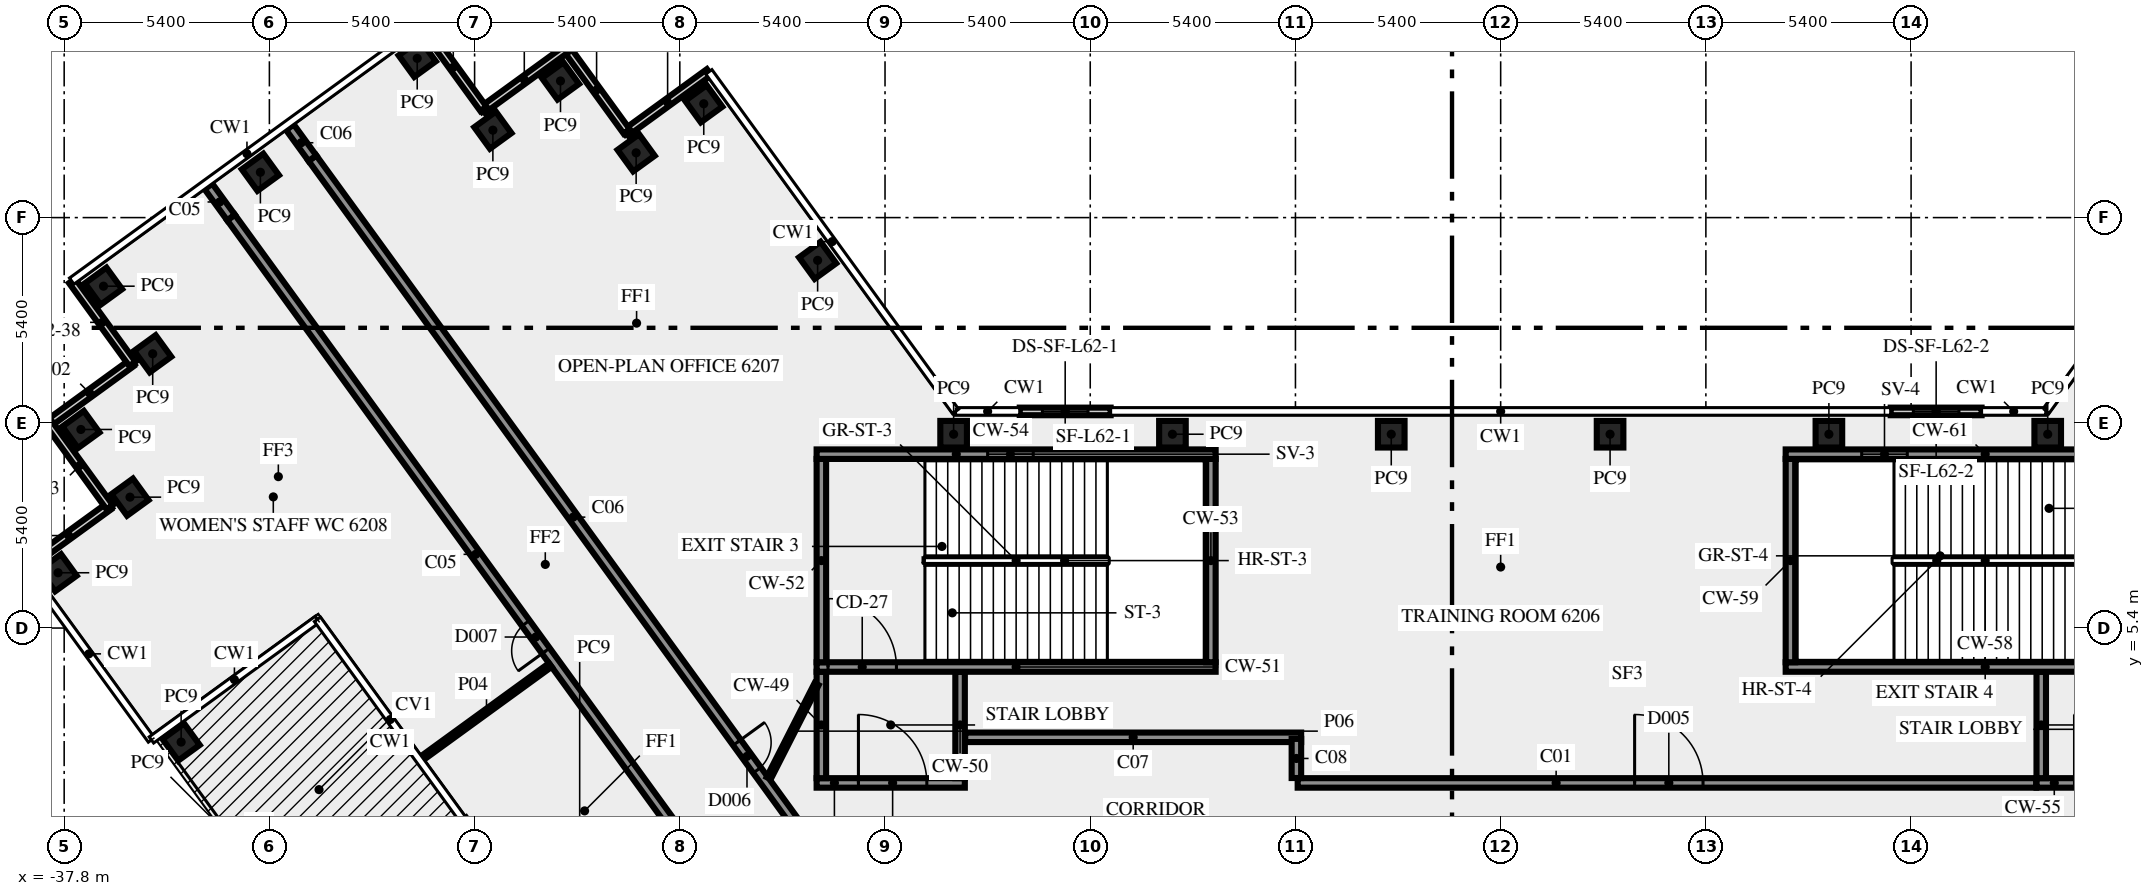
"""IFC4 building model, lengths in metres.
Left out: names, types, materials, properties, quantities, classifications, styles, units other than length and angle.
Written with IfcOpenShell. Run it as: python <this file> out.ifc"""

import sys

from ifc_helpers import new_model, si_unit, direction, frame, frame_2d, origin, origin_2d, place, context, subcontext, project, spatial, rectangle, extrude, element, fill, save


model = new_model("IFC4")
c1 = context("Model", 3, precision=1e-05, world=origin(), true_north=direction((0.0, 1.0)))
c2 = subcontext(c1, "Body", "Model", "MODEL_VIEW")
j1 = project(units=[si_unit("LENGTHUNIT", "METRE"), si_unit("PLANEANGLEUNIT", "RADIAN")], contexts=[c1])
p1 = place(None, origin())
s1 = spatial("IfcSite", under=j1, at=p1, CompositionType="ELEMENT")
p2 = place(p1, origin())
s2 = spatial("IfcBuilding", under=s1, at=p2, CompositionType="ELEMENT")
p3 = place(p2, frame((0.0, 0.0, 265.0)))
s3 = spatial("IfcBuildingStorey", under=s2, at=p3, CompositionType="ELEMENT", Elevation=265.0)
for number, where, z_axis, x_axis in (
    (1, (-17.974, 15.075, 0.0), (0.0, 0.0, 1.0), (-0.588, 0.809, 0.0)),
    (2, (-20.97, 19.195, 0.0), (0.0, 0.0, 1.0), (-0.588, 0.809, 0.0)),
    (3, (-22.749, 17.904, 0.0), (0.0, 0.0, 1.0), (-0.588, 0.809, 0.0)),
    (4, (-24.74, 19.795, 0.0), (0.0, 0.0, 1.0), (-0.588, 0.809, 0.0)),
    (5, (-26.519, 18.5, 0.0), (0.0, 0.0, 1.0), (-0.588, 0.809, 0.0)),
    (6, (-28.51, 20.39, 0.0), (0.0, 0.0, 1.0), (-0.809, -0.588, 0.0)),
    (7, (-32.637, 17.393, 0.0), (0.0, 0.0, 1.0), (-0.809, -0.588, 0.0)),
    (8, (-36.765, 14.395, 0.0), (0.0, 0.0, 1.0), (0.588, -0.809, 0.0)),
    (9, (-35.471, 12.616, 0.0), (0.0, 0.0, 1.0), (-0.809, -0.588, 0.0)),
    (10, (-37.36, 10.625, 0.0), (0.0, 0.0, 1.0), (0.588, -0.809, 0.0)),
    (11, (-36.068, 8.844, 0.0), (0.0, 0.0, 1.0), (0.588, -0.809, 0.0)),
    (12, (-37.96, 6.855, 0.0), (0.0, 0.0, 1.0), (0.588, -0.809, 0.0)),
    (13, (-34.722, 2.4, 0.0), (0.0, 0.0, 1.0), (0.588, -0.809, 0.0)),
    (14, (14.395, 10.5, 0.0), (0.0, 0.0, 1.0), (-1.0, 0.0, 0.0)),
    (15, (8.637, 10.5, 0.0), (0.0, 0.0, 1.0), (-1.0, 0.0, 0.0)),
    (16, (2.879, 10.5, 0.0), (0.0, 0.0, 1.0), (-1.0, 0.0, 0.0)),
    (17, (-2.879, 10.5, 0.0), (0.0, 0.0, 1.0), (-1.0, 0.0, 0.0)),
    (18, (-8.637, 10.5, 0.0), (0.0, 0.0, 1.0), (-1.0, 0.0, 0.0)),
    (19, (-14.395, 10.5, 0.0), (0.0, 0.0, 1.0), (-1.0, 0.0, 0.0)),
):
    element("IfcColumn", number, at=place(p3, frame(where, z_axis=z_axis, x_axis=x_axis)), inside=s3, PredefinedType="COLUMN", context=c2, shape_type="SweptSolid", body=[
        extrude(rectangle(XDim=0.7, YDim=0.7, at=origin_2d()), origin(), (0.0, 0.0, 1.0), 3.65),
    ])
p4 = place(p3, frame((-36.629, 8.597, 0.0), z_axis=(0.0, 0.0, 1.0), x_axis=(-0.80901210161, -0.587791986546, 0.0)))
e20 = element("IfcWall", 20, at=p4, inside=s3, PredefinedType="SOLIDWALL", context=c2, shape_type="SweptSolid", body=[
    extrude(rectangle(XDim=2.6, YDim=0.2, at=frame_2d((1.3, 0.0))), origin(), (0.0, 0.0, 1.0), 3.65),
])
for number, where, z_axis, x_axis in (
    (21, (-36.032, 12.369, 0.0), (0.0, 0.0, 1.0), (-0.809, -0.588, 0.0)),
    (22, (-38.189, 10.765, 0.0), (0.0, 0.0, 1.0), (0.588, -0.809, 0.0)),
):
    element("IfcWall", number, at=place(p3, frame(where, z_axis=z_axis, x_axis=x_axis)), inside=s3, PredefinedType="SOLIDWALL", context=c2, shape_type="SweptSolid", body=[
        extrude(rectangle(XDim=2.7, YDim=0.2, at=frame_2d((1.35, 0.0))), origin(), (0.0, 0.0, 1.0), 3.65),
    ])
p5 = place(p3, frame((12.655, 11.1, 0.0), z_axis=(0.0, 0.0, 1.0), x_axis=(-1.0, 0.0, 0.0)))
e23 = element("IfcWall", 23, at=p5, inside=s3, PredefinedType="SOLIDWALL", context=c2, shape_type="SweptSolid", body=[
    extrude(rectangle(XDim=2.392, YDim=0.2, at=frame_2d((1.196, 0.0))), origin(), (0.0, 0.0, 1.0), 3.65),
])
p6 = place(p5, frame((0.596, 0.0, 1.0)))
e24 = element("IfcOpeningElement", 24, at=p6, cuts=e23, PredefinedType="OPENING", context=c2, shape_type="SweptSolid", body=[
    extrude(rectangle(XDim=1.2, YDim=1.2, at=frame_2d((0.6, 0.6))), frame((0.0, 0.11, 0.0), z_axis=(0.0, -1.0, 0.0), x_axis=(1.0, 0.0, 0.0)), (0.0, 0.0, 1.0), 0.22),
])
p7 = place(p3, frame((-10.263, 11.1, 0.0), z_axis=(0.0, 0.0, 1.0), x_axis=(-1.0, 0.0, 0.0)))
e25 = element("IfcWall", 25, at=p7, inside=s3, PredefinedType="SOLIDWALL", context=c2, shape_type="SweptSolid", body=[
    extrude(rectangle(XDim=2.392, YDim=0.2, at=frame_2d((1.196, 0.0))), origin(), (0.0, 0.0, 1.0), 3.65),
])
p8 = place(p7, frame((0.596, 0.0, 1.0)))
e26 = element("IfcOpeningElement", 26, at=p8, cuts=e25, PredefinedType="OPENING", context=c2, shape_type="SweptSolid", body=[
    extrude(rectangle(XDim=1.2, YDim=1.2, at=frame_2d((0.6, 0.6))), frame((0.0, 0.11, 0.0), z_axis=(0.0, -1.0, 0.0), x_axis=(1.0, 0.0, 0.0)), (0.0, 0.0, 1.0), 0.22),
])
for number, where, z_axis, x_axis in (
    (27, (-20.829, 20.025, 0.0), (0.0, 0.0, 1.0), (-0.809, -0.588, 0.0)),
    (28, (-22.996, 18.466, 0.0), (0.0, 0.0, 1.0), (-0.588, 0.809, 0.0)),
):
    element("IfcWall", number, at=place(p3, frame(where, z_axis=z_axis, x_axis=x_axis)), inside=s3, PredefinedType="SOLIDWALL", context=c2, shape_type="SweptSolid", body=[
        extrude(rectangle(XDim=2.7, YDim=0.2, at=frame_2d((1.35, 0.0))), origin(), (0.0, 0.0, 1.0), 3.65),
    ])
for number, where, z_axis, x_axis in (
    (29, (-24.6, 20.623, 0.0), (0.0, 0.0, 1.0), (-0.809, -0.588, 0.0)),
    (30, (-26.768, 19.063, 0.0), (0.0, 0.0, 1.0), (-0.588, 0.809, 0.0)),
):
    element("IfcWall", number, at=place(p3, frame(where, z_axis=z_axis, x_axis=x_axis)), inside=s3, PredefinedType="SOLIDWALL", context=c2, shape_type="SweptSolid", body=[
        extrude(rectangle(XDim=2.7, YDim=0.2, at=frame_2d((1.35, 0.0))), origin(), (0.0, 0.0, 1.0), 3.65),
    ])
p9 = place(p3, frame((-37.592, 14.536, 0.0), z_axis=(0.0, 0.0, 1.0), x_axis=(0.587762999008, -0.809033161865, 0.0)))
e31 = element("IfcWall", 31, at=p9, inside=s3, PredefinedType="SOLIDWALL", context=c2, shape_type="SweptSolid", body=[
    extrude(rectangle(XDim=2.7, YDim=0.2, at=frame_2d((1.35, 0.0))), origin(), (0.0, 0.0, 1.0), 3.65),
])
p10 = place(p3, frame((-18.0, 1.325, 0.0), z_axis=(0.0, 0.0, 1.0), x_axis=(1.0, 0.0, 0.0)))
e32 = element("IfcWall", 32, at=p10, inside=s3, PredefinedType="SHEAR", context=c2, shape_type="SweptSolid", body=[
    extrude(rectangle(XDim=3.9, YDim=0.25, at=frame_2d((1.95, 0.0))), origin(), (0.0, 0.0, 1.0), 3.65),
])
p11 = place(p10, frame((1.1, 0.0, 0.0)))
e33 = element("IfcOpeningElement", 33, at=p11, cuts=e32, PredefinedType="OPENING", context=c2, shape_type="SweptSolid", body=[
    extrude(rectangle(XDim=1.8, YDim=2.1, at=frame_2d((0.9, 1.05))), frame((0.0, 0.135, 0.0), z_axis=(0.0, -1.0, 0.0), x_axis=(1.0, 0.0, 0.0)), (0.0, 0.0, 1.0), 0.27),
])
for number, where, z_axis, x_axis in (
    (34, (-17.875, 1.45, 0.0), (0.0, 0.0, 1.0), (0.0, 1.0, 0.0)),
    (35, (-14.225, 1.45, 0.0), (0.0, 0.0, 1.0), (0.0, 1.0, 0.0)),
):
    element("IfcWall", number, at=place(p3, frame(where, z_axis=z_axis, x_axis=x_axis)), inside=s3, PredefinedType="SHEAR", context=c2, shape_type="SweptSolid", body=[
        extrude(rectangle(XDim=2.8, YDim=0.25, at=frame_2d((1.4, 0.0))), origin(), (0.0, 0.0, 1.0), 3.65),
    ])
p12 = place(p3, frame((-18.0, 4.375, 0.0), z_axis=(0.0, 0.0, 1.0), x_axis=(1.0, 0.0, 0.0)))
e36 = element("IfcWall", 36, at=p12, inside=s3, PredefinedType="SHEAR", context=c2, shape_type="SweptSolid", body=[
    extrude(rectangle(XDim=10.5, YDim=0.25, at=frame_2d((5.25, 0.0))), origin(), (0.0, 0.0, 1.0), 3.65),
])
p13 = place(p12, frame((0.3, 0.0, 0.0)))
e37 = element("IfcOpeningElement", 37, at=p13, cuts=e36, PredefinedType="OPENING", context=c2, shape_type="SweptSolid", body=[
    extrude(rectangle(XDim=1.8, YDim=2.1, at=frame_2d((0.9, 1.05))), frame((0.0, 0.135, 0.0), z_axis=(0.0, -1.0, 0.0), x_axis=(1.0, 0.0, 0.0)), (0.0, 0.0, 1.0), 0.27),
])
for number, where, z_axis, x_axis in (
    (38, (-17.875, 4.5, 0.0), (0.0, 0.0, 1.0), (0.0, 1.0, 0.0)),
    (39, (-7.625, 4.5, 0.0), (0.0, 0.0, 1.0), (0.0, 1.0, 0.0)),
):
    element("IfcWall", number, at=place(p3, frame(where, z_axis=z_axis, x_axis=x_axis)), inside=s3, PredefinedType="SHEAR", context=c2, shape_type="SweptSolid", body=[
        extrude(rectangle(XDim=5.35, YDim=0.25, at=frame_2d((2.675, 0.0))), origin(), (0.0, 0.0, 1.0), 3.65),
    ])
p14 = place(p3, frame((-18.0, 9.975, 0.0), z_axis=(0.0, 0.0, 1.0), x_axis=(1.0, 0.0, 0.0)))
e40 = element("IfcWall", 40, at=p14, inside=s3, PredefinedType="SHEAR", context=c2, shape_type="SweptSolid", body=[
    extrude(rectangle(XDim=10.5, YDim=0.25, at=frame_2d((5.25, 0.0))), origin(), (0.0, 0.0, 1.0), 3.65),
])
p15 = place(p14, frame((4.5, 0.0, 1.0)))
e41 = element("IfcOpeningElement", 41, at=p15, cuts=e40, PredefinedType="OPENING", context=c2, shape_type="SweptSolid", body=[
    extrude(rectangle(XDim=1.2, YDim=1.2, at=frame_2d((0.6, 0.6))), frame((0.0, 0.135, 0.0), z_axis=(0.0, -1.0, 0.0), x_axis=(1.0, 0.0, 0.0)), (0.0, 0.0, 1.0), 0.27),
])
p16 = place(p3, frame((14.1, 1.325, 0.0), z_axis=(0.0, 0.0, 1.0), x_axis=(1.0, 0.0, 0.0)))
e42 = element("IfcWall", 42, at=p16, inside=s3, PredefinedType="SHEAR", context=c2, shape_type="SweptSolid", body=[
    extrude(rectangle(XDim=3.9, YDim=0.25, at=frame_2d((1.95, 0.0))), origin(), (0.0, 0.0, 1.0), 3.65),
])
p17 = place(p16, frame((1.0, 0.0, 0.0)))
e43 = element("IfcOpeningElement", 43, at=p17, cuts=e42, PredefinedType="OPENING", context=c2, shape_type="SweptSolid", body=[
    extrude(rectangle(XDim=1.8, YDim=2.1, at=frame_2d((0.9, 1.05))), frame((0.0, 0.135, 0.0), z_axis=(0.0, -1.0, 0.0), x_axis=(1.0, 0.0, 0.0)), (0.0, 0.0, 1.0), 0.27),
])
p18 = place(p3, frame((14.225, 1.45, 0.0), z_axis=(0.0, 0.0, 1.0), x_axis=(0.0, 1.0, 0.0)))
e44 = element("IfcWall", 44, at=p18, inside=s3, PredefinedType="SHEAR", context=c2, shape_type="SweptSolid", body=[
    extrude(rectangle(XDim=2.8, YDim=0.25, at=frame_2d((1.4, 0.0))), origin(), (0.0, 0.0, 1.0), 3.65),
])
p19 = place(p3, frame((7.5, 4.375, 0.0), z_axis=(0.0, 0.0, 1.0), x_axis=(1.0, 0.0, 0.0)))
e45 = element("IfcWall", 45, at=p19, inside=s3, PredefinedType="SHEAR", context=c2, shape_type="SweptSolid", body=[
    extrude(rectangle(XDim=10.5, YDim=0.25, at=frame_2d((5.25, 0.0))), origin(), (0.0, 0.0, 1.0), 3.65),
])
p20 = place(p19, frame((8.4, 0.0, 0.0)))
e46 = element("IfcOpeningElement", 46, at=p20, cuts=e45, PredefinedType="OPENING", context=c2, shape_type="SweptSolid", body=[
    extrude(rectangle(XDim=1.8, YDim=2.1, at=frame_2d((0.9, 1.05))), frame((0.0, 0.135, 0.0), z_axis=(0.0, -1.0, 0.0), x_axis=(1.0, 0.0, 0.0)), (0.0, 0.0, 1.0), 0.27),
])
p21 = place(p3, frame((7.625, 4.5, 0.0), z_axis=(0.0, 0.0, 1.0), x_axis=(0.0, 1.0, 0.0)))
e47 = element("IfcWall", 47, at=p21, inside=s3, PredefinedType="SHEAR", context=c2, shape_type="SweptSolid", body=[
    extrude(rectangle(XDim=5.35, YDim=0.25, at=frame_2d((2.675, 0.0))), origin(), (0.0, 0.0, 1.0), 3.65),
])
p22 = place(p3, frame((7.5, 9.975, 0.0), z_axis=(0.0, 0.0, 1.0), x_axis=(1.0, 0.0, 0.0)))
e48 = element("IfcWall", 48, at=p22, inside=s3, PredefinedType="SHEAR", context=c2, shape_type="SweptSolid", body=[
    extrude(rectangle(XDim=10.5, YDim=0.25, at=frame_2d((5.25, 0.0))), origin(), (0.0, 0.0, 1.0), 3.65),
])
p23 = place(p22, frame((2.0, 0.0, 1.0)))
e49 = element("IfcOpeningElement", 49, at=p23, cuts=e48, PredefinedType="OPENING", context=c2, shape_type="SweptSolid", body=[
    extrude(rectangle(XDim=1.2, YDim=1.2, at=frame_2d((0.6, 0.6))), frame((0.0, 0.135, 0.0), z_axis=(0.0, -1.0, 0.0), x_axis=(1.0, 0.0, 0.0)), (0.0, 0.0, 1.0), 0.27),
])
p24 = place(p3, frame((-5.341, 1.325, 0.0), z_axis=(0.0, 0.0, 1.0), x_axis=(1.0, 0.0, 0.0)))
e50 = element("IfcWall", 50, at=p24, inside=s3, PredefinedType="SOLIDWALL", context=c2, shape_type="SweptSolid", body=[
    extrude(rectangle(XDim=19.431, YDim=0.25, at=frame_2d((9.716, 0.0))), origin(), (0.0, 0.0, 1.0), 3.65),
])
p25 = place(p24, frame((8.866, 0.0, 0.0)))
e51 = element("IfcOpeningElement", 51, at=p25, cuts=e50, PredefinedType="OPENING", context=c2, shape_type="SweptSolid", body=[
    extrude(rectangle(XDim=1.8, YDim=2.1, at=frame_2d((0.9, 1.05))), frame((0.0, 0.135, 0.0), z_axis=(0.0, -1.0, 0.0), x_axis=(1.0, 0.0, 0.0)), (0.0, 0.0, 1.0), 0.27),
])
p26 = place(p3, frame((-20.531, -1.523, 0.0), z_axis=(0.0, 0.0, 1.0), x_axis=(-0.587786711753, 0.809015934013, 0.0)))
e52 = element("IfcWall", 52, at=p26, inside=s3, PredefinedType="SOLIDWALL", context=c2, shape_type="SweptSolid", body=[
    extrude(rectangle(XDim=21.911, YDim=0.25, at=frame_2d((10.956, 0.0))), origin(), (0.0, 0.0, 1.0), 3.65),
])
p27 = place(p26, frame((0.533, 0.0, 0.0)))
e53 = element("IfcOpeningElement", 53, at=p27, cuts=e52, PredefinedType="OPENING", context=c2, shape_type="SweptSolid", body=[
    extrude(rectangle(XDim=0.9, YDim=2.1, at=frame_2d((0.45, 1.05))), frame((0.0, 0.135, 0.0), z_axis=(0.0, -1.0, 0.0), x_axis=(1.0, 0.0, 0.0)), (0.0, 0.0, 1.0), 0.27),
])
p28 = place(p26, frame((7.816, 0.0, 0.0)))
e54 = element("IfcOpeningElement", 54, at=p28, cuts=e52, PredefinedType="OPENING", context=c2, shape_type="SweptSolid", body=[
    extrude(rectangle(XDim=0.9, YDim=2.1, at=frame_2d((0.45, 1.05))), frame((0.0, 0.135, 0.0), z_axis=(0.0, -1.0, 0.0), x_axis=(1.0, 0.0, 0.0)), (0.0, 0.0, 1.0), 0.27),
])
p29 = place(p3, frame((-31.267, 17.762, 0.0), z_axis=(0.0, 0.0, 1.0), x_axis=(0.587787966774, -0.809015022181, 0.0)))
e55 = element("IfcWall", 55, at=p29, inside=s3, PredefinedType="SOLIDWALL", context=c2, shape_type="SweptSolid", body=[
    extrude(rectangle(XDim=23.345, YDim=0.25, at=frame_2d((11.672, 0.0))), origin(), (0.0, 0.0, 1.0), 3.65),
])
p30 = place(p29, frame((19.004, 0.0, 0.0)))
e56 = element("IfcOpeningElement", 56, at=p30, cuts=e55, PredefinedType="OPENING", context=c2, shape_type="SweptSolid", body=[
    extrude(rectangle(XDim=0.9, YDim=2.1, at=frame_2d((0.45, 1.05))), frame((0.0, 0.135, 0.0), z_axis=(0.0, -1.0, 0.0), x_axis=(1.0, 0.0, 0.0)), (0.0, 0.0, 1.0), 0.27),
])
p31 = place(p3, frame((-14.09, 2.525, 0.0), z_axis=(0.0, 0.0, 1.0), x_axis=(1.0, 0.0, 0.0)))
e57 = element("IfcWall", 57, at=p31, inside=s3, PredefinedType="SOLIDWALL", context=c2, shape_type="SweptSolid", body=[
    extrude(rectangle(XDim=8.84, YDim=0.25, at=frame_2d((4.42, 0.0))), origin(), (0.0, 0.0, 1.0), 3.65),
])
p32 = place(p3, frame((-5.375, 2.484, 0.0), z_axis=(0.0, 0.0, 1.0), x_axis=(0.0, -1.0, 0.0)))
e58 = element("IfcWall", 58, at=p32, inside=s3, PredefinedType="SOLIDWALL", context=c2, shape_type="SweptSolid", body=[
    extrude(rectangle(XDim=1.03, YDim=0.25, at=frame_2d((0.515, 0.0))), origin(), (0.0, 0.0, 1.0), 3.65),
])
p33 = place(p3, frame((-25.008, 4.427, 0.0), z_axis=(0.0, 0.0, 1.0), x_axis=(-0.809020893444, -0.587779885646, 0.0)))
e59 = element("IfcWall", 59, at=p33, inside=s3, PredefinedType="PARTITIONING", context=c2, shape_type="SweptSolid", body=[
    extrude(rectangle(XDim=4.15, YDim=0.12, at=frame_2d((2.075, 0.0))), origin(), (0.0, 0.0, 1.0), 3.65),
])
p34 = place(p3, frame((-19.261, 1.45, 0.0), z_axis=(0.0, 0.0, 1.0), x_axis=(0.453950796792, 0.891026752736, 0.0)))
e60 = element("IfcWall", 60, at=p34, inside=s3, PredefinedType="PARTITIONING", context=c2, shape_type="SweptSolid", body=[
    extrude(rectangle(XDim=2.778, YDim=0.12, at=frame_2d((1.389, 0.0))), origin(), (0.0, 0.0, 1.0), 3.65),
])
p35 = place(p3, frame((-33.41, 16.203, 0.0), z_axis=(0.0, 0.0, 1.0), x_axis=(-0.587696850957, 0.809081214326, 0.0)))
e61 = element("IfcWall", 61, at=p35, inside=s3, PredefinedType="SOLIDWALL", context=c2, shape_type="SweptSolid", body=[
    extrude(rectangle(XDim=1.009, YDim=0.25, at=frame_2d((0.504, 0.0))), origin(), (0.0, 0.0, 1.0), 2.95),
])
p36 = place(p3, frame((-31.267, 17.762, 0.0), z_axis=(0.0, 0.0, 1.0), x_axis=(-0.587840411638, 0.808976915892, 0.0)))
e62 = element("IfcWall", 62, at=p36, inside=s3, PredefinedType="SOLIDWALL", context=c2, shape_type="SweptSolid", body=[
    extrude(rectangle(XDim=1.008, YDim=0.25, at=frame_2d((0.504, 0.0))), origin(), (0.0, 0.0, 1.0), 2.95),
])
p37 = place(p6, origin())
e63 = element("IfcWindow", 63, at=p37, inside=s3, PartitioningType="SINGLE_PANEL", PredefinedType="WINDOW", context=c2, shape_type="SweptSolid", body=[
    extrude(rectangle(XDim=1.2, YDim=1.2, at=frame_2d((0.6, 0.6))), frame((0.0, 0.03, 0.0), z_axis=(0.0, -1.0, 0.0), x_axis=(1.0, 0.0, 0.0)), (0.0, 0.0, 1.0), 0.06),
])
fill(e24, e63)
p38 = place(p8, origin())
e64 = element("IfcWindow", 64, at=p38, inside=s3, PartitioningType="SINGLE_PANEL", PredefinedType="WINDOW", context=c2, shape_type="SweptSolid", body=[
    extrude(rectangle(XDim=1.2, YDim=1.2, at=frame_2d((0.6, 0.6))), frame((0.0, 0.03, 0.0), z_axis=(0.0, -1.0, 0.0), x_axis=(1.0, 0.0, 0.0)), (0.0, 0.0, 1.0), 0.06),
])
fill(e26, e64)
p39 = place(p11, origin())
e65 = element("IfcDoor", 65, at=p39, inside=s3, OperationType="DOUBLE_DOOR_SINGLE_SWING", PredefinedType="DOOR", context=c2, shape_type="SweptSolid", body=[
    extrude(rectangle(XDim=1.8, YDim=2.1, at=frame_2d((0.9, 1.05))), frame((0.0, 0.025, 0.0), z_axis=(0.0, -1.0, 0.0), x_axis=(1.0, 0.0, 0.0)), (0.0, 0.0, 1.0), 0.05),
])
fill(e33, e65)
p40 = place(p13, origin())
e66 = element("IfcDoor", 66, at=p40, inside=s3, OperationType="DOUBLE_DOOR_SINGLE_SWING", PredefinedType="DOOR", context=c2, shape_type="SweptSolid", body=[
    extrude(rectangle(XDim=1.8, YDim=2.1, at=frame_2d((0.9, 1.05))), frame((0.0, 0.025, 0.0), z_axis=(0.0, -1.0, 0.0), x_axis=(1.0, 0.0, 0.0)), (0.0, 0.0, 1.0), 0.05),
])
fill(e37, e66)
p41 = place(p15, origin())
e67 = element("IfcWindow", 67, at=p41, inside=s3, PartitioningType="SINGLE_PANEL", PredefinedType="WINDOW", context=c2, shape_type="SweptSolid", body=[
    extrude(rectangle(XDim=1.2, YDim=1.2, at=frame_2d((0.6, 0.6))), frame((0.0, 0.03, 0.0), z_axis=(0.0, -1.0, 0.0), x_axis=(1.0, 0.0, 0.0)), (0.0, 0.0, 1.0), 0.06),
])
fill(e41, e67)
p42 = place(p17, origin())
e68 = element("IfcDoor", 68, at=p42, inside=s3, OperationType="DOUBLE_DOOR_SINGLE_SWING", PredefinedType="DOOR", context=c2, shape_type="SweptSolid", body=[
    extrude(rectangle(XDim=1.8, YDim=2.1, at=frame_2d((0.9, 1.05))), frame((0.0, 0.025, 0.0), z_axis=(0.0, -1.0, 0.0), x_axis=(1.0, 0.0, 0.0)), (0.0, 0.0, 1.0), 0.05),
])
fill(e43, e68)
p43 = place(p23, origin())
e69 = element("IfcWindow", 69, at=p43, inside=s3, PartitioningType="SINGLE_PANEL", PredefinedType="WINDOW", context=c2, shape_type="SweptSolid", body=[
    extrude(rectangle(XDim=1.2, YDim=1.2, at=frame_2d((0.6, 0.6))), frame((0.0, 0.03, 0.0), z_axis=(0.0, -1.0, 0.0), x_axis=(1.0, 0.0, 0.0)), (0.0, 0.0, 1.0), 0.06),
])
fill(e49, e69)
p44 = place(p30, origin())
e70 = element("IfcDoor", 70, at=p44, inside=s3, OperationType="SINGLE_SWING_RIGHT", PredefinedType="DOOR", context=c2, shape_type="SweptSolid", body=[
    extrude(rectangle(XDim=0.9, YDim=2.1, at=frame_2d((0.45, 1.05))), frame((0.0, 0.025, 0.0), z_axis=(0.0, -1.0, 0.0), x_axis=(1.0, 0.0, 0.0)), (0.0, 0.0, 1.0), 0.05),
])
fill(e56, e70)
p45 = place(p28, origin())
e71 = element("IfcDoor", 71, at=p45, inside=s3, OperationType="SINGLE_SWING_LEFT", PredefinedType="DOOR", context=c2, shape_type="SweptSolid", body=[
    extrude(rectangle(XDim=0.9, YDim=2.1, at=frame_2d((0.45, 1.05))), frame((0.0, 0.025, 0.0), z_axis=(0.0, -1.0, 0.0), x_axis=(1.0, 0.0, 0.0)), (0.0, 0.0, 1.0), 0.05),
])
fill(e54, e71)
p46 = place(p25, origin())
e72 = element("IfcDoor", 72, at=p46, inside=s3, OperationType="DOUBLE_DOOR_SINGLE_SWING", PredefinedType="DOOR", context=c2, shape_type="SweptSolid", body=[
    extrude(rectangle(XDim=1.8, YDim=2.1, at=frame_2d((0.9, 1.05))), frame((0.0, 0.025, 0.0), z_axis=(0.0, -1.0, 0.0), x_axis=(1.0, 0.0, 0.0)), (0.0, 0.0, 1.0), 0.05),
])
fill(e51, e72)
save(model, sys.argv[1])
